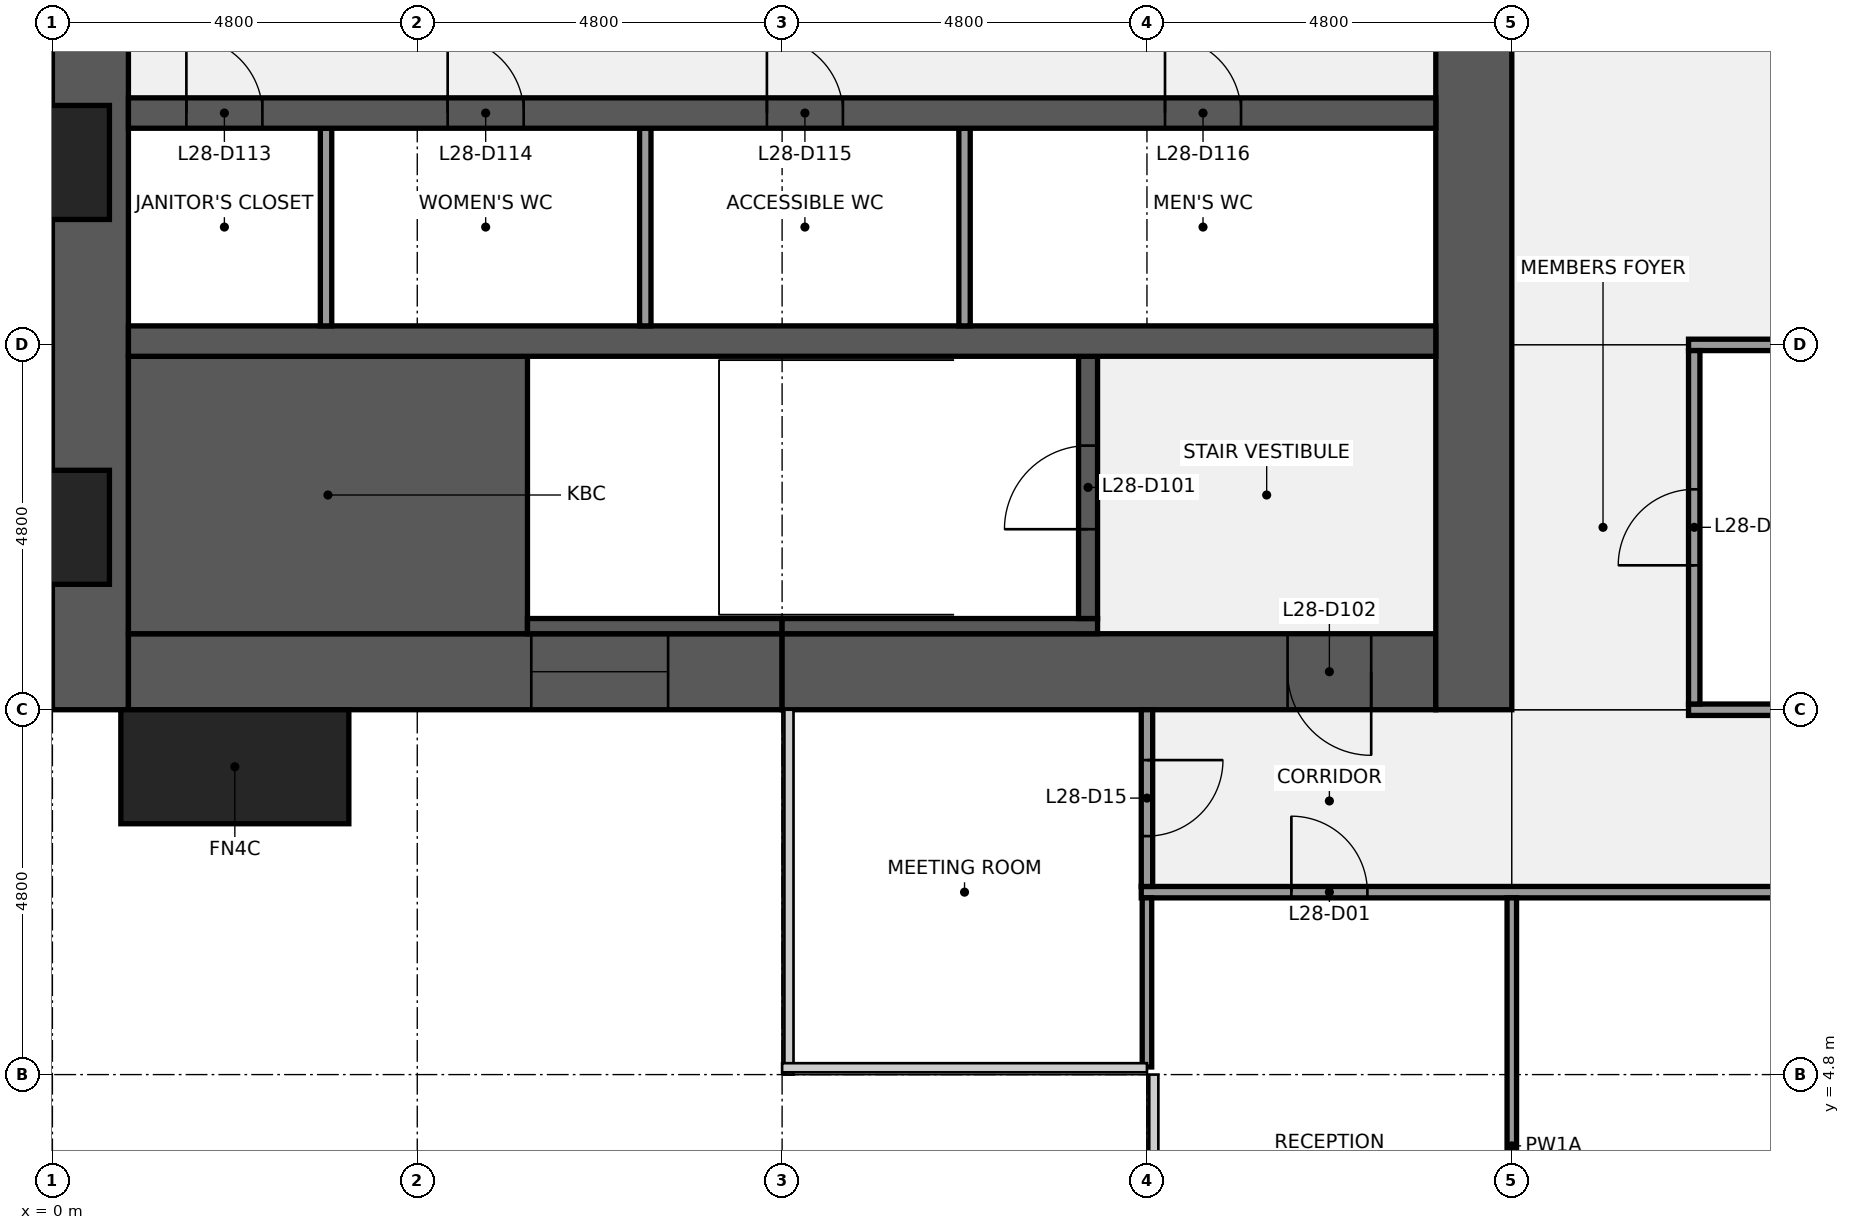
"""IFC4 building model, lengths in metres.
Left out: names, types, materials, properties, quantities, classifications, styles, units other than length and angle.
Written with IfcOpenShell. Run it as: python <this file> out.ifc"""

import sys

from ifc_helpers import new_model, si_unit, direction, frame, frame_2d, origin, origin_2d, place, context, subcontext, project, spatial, rectangle, extrude, element, fill, save


model = new_model("IFC4")
c1 = context("Model", 3, precision=1e-05, world=origin(), true_north=direction((0.0, 1.0)))
c2 = subcontext(c1, "Body", "Model", "MODEL_VIEW")
j1 = project(units=[si_unit("LENGTHUNIT", "METRE"), si_unit("PLANEANGLEUNIT", "RADIAN")], contexts=[c1])
p1 = place(None, origin())
s1 = spatial("IfcSite", under=j1, at=p1, CompositionType="ELEMENT")
p2 = place(p1, origin())
s2 = spatial("IfcBuilding", under=s1, at=p2, CompositionType="ELEMENT")
p3 = place(p2, frame((0.0, 0.0, 132.1)))
s3 = spatial("IfcBuildingStorey", under=s2, at=p3, CompositionType="ELEMENT", Elevation=132.1)
p4 = place(p3, frame((0.5, 9.6, 0.0), z_axis=(0.0, 0.0, 1.0), x_axis=(0.0, 1.0, 0.0)))
e1 = element("IfcWall", 1, at=p4, inside=s3, PredefinedType="SHEAR", context=c2, shape_type="SweptSolid", body=[
    extrude(rectangle(XDim=28.8, YDim=1.0, at=frame_2d((14.4, 0.0))), origin(), (0.0, 0.0, 1.0), 3.84),
])
p5 = place(p4, frame((8.85, 0.0, 0.9)))
e2 = element("IfcOpeningElement", 2, at=p5, cuts=e1, PredefinedType="OPENING", context=c2, shape_type="SweptSolid", body=[
    extrude(rectangle(XDim=1.5, YDim=1.5, at=frame_2d((0.75, 0.75))), frame((0.0, 0.51, 0.0), z_axis=(0.0, -1.0, 0.0), x_axis=(1.0, 0.0, 0.0)), (0.0, 0.0, 1.0), 1.02),
])
p6 = place(p4, frame((18.45, 0.0, 0.9)))
e3 = element("IfcOpeningElement", 3, at=p6, cuts=e1, PredefinedType="OPENING", context=c2, shape_type="SweptSolid", body=[
    extrude(rectangle(XDim=1.5, YDim=1.5, at=frame_2d((0.75, 0.75))), frame((0.0, 0.51, 0.0), z_axis=(0.0, -1.0, 0.0), x_axis=(1.0, 0.0, 0.0)), (0.0, 0.0, 1.0), 1.02),
])
p7 = place(p3, frame((9.6, 10.1, 0.0), z_axis=(0.0, 0.0, 1.0), x_axis=(-1.0, 0.0, 0.0)))
e4 = element("IfcWall", 4, at=p7, inside=s3, PredefinedType="SHEAR", context=c2, shape_type="SweptSolid", body=[
    extrude(rectangle(XDim=8.6, YDim=1.0, at=frame_2d((4.3, 0.0))), origin(), (0.0, 0.0, 1.0), 3.84),
])
p8 = place(p7, frame((1.5, 0.0, 0.9)))
e5 = element("IfcOpeningElement", 5, at=p8, cuts=e4, PredefinedType="OPENING", context=c2, shape_type="SweptSolid", body=[
    extrude(rectangle(XDim=1.8, YDim=1.5, at=frame_2d((0.9, 0.75))), frame((0.0, 0.51, 0.0), z_axis=(0.0, -1.0, 0.0), x_axis=(1.0, 0.0, 0.0)), (0.0, 0.0, 1.0), 1.02),
])
p9 = place(p3, frame((18.2, 10.1, 0.0), z_axis=(0.0, 0.0, 1.0), x_axis=(-1.0, 0.0, 0.0)))
e6 = element("IfcWall", 6, at=p9, inside=s3, PredefinedType="SHEAR", context=c2, shape_type="SweptSolid", body=[
    extrude(rectangle(XDim=8.6, YDim=1.0, at=frame_2d((4.3, 0.0))), origin(), (0.0, 0.0, 1.0), 3.84),
])
p10 = place(p9, frame((0.85, 0.0, 0.0)))
e7 = element("IfcOpeningElement", 7, at=p10, cuts=e6, PredefinedType="OPENING", context=c2, shape_type="SweptSolid", body=[
    extrude(rectangle(XDim=1.1, YDim=2.1, at=frame_2d((0.55, 1.05))), frame((0.0, 0.51, 0.0), z_axis=(0.0, -1.0, 0.0), x_axis=(1.0, 0.0, 0.0)), (0.0, 0.0, 1.0), 1.02),
])
p11 = place(p3, frame((18.7, 38.4, 0.0), z_axis=(0.0, 0.0, 1.0), x_axis=(0.0, -1.0, 0.0)))
e8 = element("IfcWall", 8, at=p11, inside=s3, PredefinedType="SHEAR", context=c2, shape_type="SweptSolid", body=[
    extrude(rectangle(XDim=28.8, YDim=1.0, at=frame_2d((14.4, 0.0))), origin(), (0.0, 0.0, 1.0), 3.84),
])
p12 = place(p11, frame((18.3, 0.0, 0.0)))
e9 = element("IfcOpeningElement", 9, at=p12, cuts=e8, PredefinedType="OPENING", context=c2, shape_type="SweptSolid", body=[
    extrude(rectangle(XDim=1.8, YDim=2.1, at=frame_2d((0.9, 1.05))), frame((0.0, 0.51, 0.0), z_axis=(0.0, -1.0, 0.0), x_axis=(1.0, 0.0, 0.0)), (0.0, 0.0, 1.0), 1.02),
])
p13 = place(p11, frame((8.7, 0.0, 0.0)))
e10 = element("IfcOpeningElement", 10, at=p13, cuts=e8, PredefinedType="OPENING", context=c2, shape_type="SweptSolid", body=[
    extrude(rectangle(XDim=1.8, YDim=2.1, at=frame_2d((0.9, 1.05))), frame((0.0, 0.51, 0.0), z_axis=(0.0, -1.0, 0.0), x_axis=(1.0, 0.0, 0.0)), (0.0, 0.0, 1.0), 1.02),
])
p14 = place(p3, frame((1.0, 12.425, 0.0), z_axis=(0.0, 0.0, 1.0), x_axis=(1.0, 0.0, 0.0)))
e11 = element("IfcWall", 11, at=p14, inside=s3, PredefinedType="SHEAR", context=c2, shape_type="SweptSolid", body=[
    extrude(rectangle(XDim=5.25, YDim=3.65, at=frame_2d((2.625, 0.0))), origin(), (0.0, 0.0, 1.0), 3.84),
])
p15 = place(p3, frame((6.25, 10.7, 0.0), z_axis=(0.0, 0.0, 1.0), x_axis=(1.0, 0.0, 0.0)))
e12 = element("IfcWall", 12, at=p15, inside=s3, PredefinedType="SHEAR", context=c2, shape_type="SweptSolid", body=[
    extrude(rectangle(XDim=3.35, YDim=0.2, at=frame_2d((1.675, 0.0))), origin(), (0.0, 0.0, 1.0), 3.84),
])
p16 = place(p3, frame((9.6, 10.7, 0.0), z_axis=(0.0, 0.0, 1.0), x_axis=(1.0, 0.0, 0.0)))
e13 = element("IfcWall", 13, at=p16, inside=s3, PredefinedType="SHEAR", context=c2, shape_type="SweptSolid", body=[
    extrude(rectangle(XDim=4.15, YDim=0.2, at=frame_2d((2.075, 0.0))), origin(), (0.0, 0.0, 1.0), 3.84),
])
p17 = place(p3, frame((13.625, 10.8, 0.0), z_axis=(0.0, 0.0, 1.0), x_axis=(0.0, 1.0, 0.0)))
e14 = element("IfcWall", 14, at=p17, inside=s3, PredefinedType="SHEAR", context=c2, shape_type="SweptSolid", body=[
    extrude(rectangle(XDim=3.45, YDim=0.25, at=frame_2d((1.725, 0.0))), origin(), (0.0, 0.0, 1.0), 3.84),
])
p18 = place(p17, frame((1.175, 0.0, 0.0)))
e15 = element("IfcOpeningElement", 15, at=p18, cuts=e14, PredefinedType="OPENING", context=c2, shape_type="SweptSolid", body=[
    extrude(rectangle(XDim=1.1, YDim=2.1, at=frame_2d((0.55, 1.05))), frame((0.0, 0.135, 0.0), z_axis=(0.0, -1.0, 0.0), x_axis=(1.0, 0.0, 0.0)), (0.0, 0.0, 1.0), 0.27),
])
p19 = place(p3, frame((1.0, 14.45, 0.0), z_axis=(0.0, 0.0, 1.0), x_axis=(1.0, 0.0, 0.0)))
e16 = element("IfcWall", 16, at=p19, inside=s3, PredefinedType="SHEAR", context=c2, shape_type="SweptSolid", body=[
    extrude(rectangle(XDim=17.2, YDim=0.4, at=frame_2d((8.6, 0.0))), origin(), (0.0, 0.0, 1.0), 3.84),
])
for number, where, z_axis, x_axis in (
    (17, (3.6, 14.65, 0.0), (0.0, 0.0, 1.0), (0.0, 1.0, 0.0)),
    (18, (7.8, 14.65, 0.0), (0.0, 0.0, 1.0), (0.0, 1.0, 0.0)),
    (19, (12.0, 14.65, 0.0), (0.0, 0.0, 1.0), (0.0, 1.0, 0.0)),
):
    element("IfcWall", number, at=place(p3, frame(where, z_axis=z_axis, x_axis=x_axis)), inside=s3, PredefinedType="PARTITIONING", context=c2, shape_type="SweptSolid", body=[
        extrude(rectangle(XDim=2.6, YDim=0.15, at=frame_2d((1.3, 0.0))), origin(), (0.0, 0.0, 1.0), 3.84),
    ])
p20 = place(p3, frame((1.0, 17.45, 0.0), z_axis=(0.0, 0.0, 1.0), x_axis=(1.0, 0.0, 0.0)))
e20 = element("IfcWall", 20, at=p20, inside=s3, PredefinedType="SHEAR", context=c2, shape_type="SweptSolid", body=[
    extrude(rectangle(XDim=17.2, YDim=0.4, at=frame_2d((8.6, 0.0))), origin(), (0.0, 0.0, 1.0), 3.84),
])
p21 = place(p20, frame((0.762, 0.0, 0.0)))
e21 = element("IfcOpeningElement", 21, at=p21, cuts=e20, PredefinedType="OPENING", context=c2, shape_type="SweptSolid", body=[
    extrude(rectangle(XDim=1.0, YDim=2.1, at=frame_2d((0.5, 1.05))), frame((0.0, 0.21, 0.0), z_axis=(0.0, -1.0, 0.0), x_axis=(1.0, 0.0, 0.0)), (0.0, 0.0, 1.0), 0.42),
])
p22 = place(p20, frame((4.2, 0.0, 0.0)))
e22 = element("IfcOpeningElement", 22, at=p22, cuts=e20, PredefinedType="OPENING", context=c2, shape_type="SweptSolid", body=[
    extrude(rectangle(XDim=1.0, YDim=2.1, at=frame_2d((0.5, 1.05))), frame((0.0, 0.21, 0.0), z_axis=(0.0, -1.0, 0.0), x_axis=(1.0, 0.0, 0.0)), (0.0, 0.0, 1.0), 0.42),
])
p23 = place(p20, frame((8.4, 0.0, 0.0)))
e23 = element("IfcOpeningElement", 23, at=p23, cuts=e20, PredefinedType="OPENING", context=c2, shape_type="SweptSolid", body=[
    extrude(rectangle(XDim=1.0, YDim=2.1, at=frame_2d((0.5, 1.05))), frame((0.0, 0.21, 0.0), z_axis=(0.0, -1.0, 0.0), x_axis=(1.0, 0.0, 0.0)), (0.0, 0.0, 1.0), 0.42),
])
p24 = place(p20, frame((13.637, 0.0, 0.0)))
e24 = element("IfcOpeningElement", 24, at=p24, cuts=e20, PredefinedType="OPENING", context=c2, shape_type="SweptSolid", body=[
    extrude(rectangle(XDim=1.0, YDim=2.1, at=frame_2d((0.5, 1.05))), frame((0.0, 0.21, 0.0), z_axis=(0.0, -1.0, 0.0), x_axis=(1.0, 0.0, 0.0)), (0.0, 0.0, 1.0), 0.42),
])
p25 = place(p3, frame((14.325, 7.2, 0.0), z_axis=(0.0, 0.0, 1.0), x_axis=(1.0, 0.0, 0.0)))
e25 = element("IfcWall", 25, at=p25, inside=s3, PredefinedType="PARTITIONING", context=c2, shape_type="SweptSolid", body=[
    extrude(rectangle(XDim=28.95, YDim=0.15, at=frame_2d((14.475, 0.0))), origin(), (0.0, 0.0, 1.0), 2.936),
])
p26 = place(p25, frame((1.975, 0.0, 0.0)))
e26 = element("IfcOpeningElement", 26, at=p26, cuts=e25, PredefinedType="OPENING", context=c2, shape_type="SweptSolid", body=[
    extrude(rectangle(XDim=1.0, YDim=2.1, at=frame_2d((0.5, 1.05))), frame((0.0, 0.085, 0.0), z_axis=(0.0, -1.0, 0.0), x_axis=(1.0, 0.0, 0.0)), (0.0, 0.0, 1.0), 0.17),
])
p27 = place(p25, frame((13.975, 0.0, 0.0)))
e27 = element("IfcOpeningElement", 27, at=p27, cuts=e25, PredefinedType="OPENING", context=c2, shape_type="SweptSolid", body=[
    extrude(rectangle(XDim=1.0, YDim=2.1, at=frame_2d((0.5, 1.05))), frame((0.0, 0.085, 0.0), z_axis=(0.0, -1.0, 0.0), x_axis=(1.0, 0.0, 0.0)), (0.0, 0.0, 1.0), 0.17),
])
p28 = place(p25, frame((25.975, 0.0, 0.0)))
e28 = element("IfcOpeningElement", 28, at=p28, cuts=e25, PredefinedType="OPENING", context=c2, shape_type="SweptSolid", body=[
    extrude(rectangle(XDim=1.0, YDim=2.1, at=frame_2d((0.5, 1.05))), frame((0.0, 0.085, 0.0), z_axis=(0.0, -1.0, 0.0), x_axis=(1.0, 0.0, 0.0)), (0.0, 0.0, 1.0), 0.17),
])
p29 = place(p3, frame((21.525, 9.6, 0.0), z_axis=(0.0, 0.0, 1.0), x_axis=(1.0, 0.0, 0.0)))
e29 = element("IfcWall", 29, at=p29, inside=s3, PredefinedType="PARTITIONING", context=c2, shape_type="SweptSolid", body=[
    extrude(rectangle(XDim=14.55, YDim=0.15, at=frame_2d((7.275, 0.0))), origin(), (0.0, 0.0, 1.0), 2.936),
])
p30 = place(p29, frame((6.775, 0.0, 0.0)))
e30 = element("IfcOpeningElement", 30, at=p30, cuts=e29, PredefinedType="OPENING", context=c2, shape_type="SweptSolid", body=[
    extrude(rectangle(XDim=1.0, YDim=2.1, at=frame_2d((0.5, 1.05))), frame((0.0, 0.085, 0.0), z_axis=(0.0, -1.0, 0.0), x_axis=(1.0, 0.0, 0.0)), (0.0, 0.0, 1.0), 0.17),
])
p31 = place(p29, frame((11.575, 0.0, 0.0)))
e31 = element("IfcOpeningElement", 31, at=p31, cuts=e29, PredefinedType="OPENING", context=c2, shape_type="SweptSolid", body=[
    extrude(rectangle(XDim=1.0, YDim=2.1, at=frame_2d((0.5, 1.05))), frame((0.0, 0.085, 0.0), z_axis=(0.0, -1.0, 0.0), x_axis=(1.0, 0.0, 0.0)), (0.0, 0.0, 1.0), 0.17),
])
p32 = place(p3, frame((21.525, 14.4, 0.0), z_axis=(0.0, 0.0, 1.0), x_axis=(1.0, 0.0, 0.0)))
e32 = element("IfcWall", 32, at=p32, inside=s3, PredefinedType="PARTITIONING", context=c2, shape_type="SweptSolid", body=[
    extrude(rectangle(XDim=4.95, YDim=0.15, at=frame_2d((2.475, 0.0))), origin(), (0.0, 0.0, 1.0), 2.936),
])
p33 = place(p3, frame((14.4, 4.9, 0.0), z_axis=(0.0, 0.0, 1.0), x_axis=(0.0, 1.0, 0.0)))
e33 = element("IfcWall", 33, at=p33, inside=s3, PredefinedType="PARTITIONING", context=c2, shape_type="SweptSolid", body=[
    extrude(rectangle(XDim=2.225, YDim=0.125, at=frame_2d((1.113, 0.0))), origin(), (0.0, 0.0, 1.0), 2.936),
])
p34 = place(p3, frame((14.4, 7.275, 0.0), z_axis=(0.0, 0.0, 1.0), x_axis=(0.0, 1.0, 0.0)))
e34 = element("IfcWall", 34, at=p34, inside=s3, PredefinedType="PARTITIONING", context=c2, shape_type="SweptSolid", body=[
    extrude(rectangle(XDim=2.325, YDim=0.15, at=frame_2d((1.163, 0.0))), origin(), (0.0, 0.0, 1.0), 2.936),
])
p35 = place(p34, frame((0.663, 0.0, 0.0)))
e35 = element("IfcOpeningElement", 35, at=p35, cuts=e34, PredefinedType="OPENING", context=c2, shape_type="SweptSolid", body=[
    extrude(rectangle(XDim=1.0, YDim=2.1, at=frame_2d((0.5, 1.05))), frame((0.0, 0.085, 0.0), z_axis=(0.0, -1.0, 0.0), x_axis=(1.0, 0.0, 0.0)), (0.0, 0.0, 1.0), 0.17),
])
p36 = place(p3, frame((19.2, 0.6, 0.0), z_axis=(0.0, 0.0, 1.0), x_axis=(0.0, 1.0, 0.0)))
e36 = element("IfcWall", 36, at=p36, inside=s3, PredefinedType="PARTITIONING", context=c2, shape_type="SweptSolid", body=[
    extrude(rectangle(XDim=6.525, YDim=0.125, at=frame_2d((3.262, 0.0))), origin(), (0.0, 0.0, 1.0), 2.936),
])
p37 = place(p3, frame((21.6, 9.675, 0.0), z_axis=(0.0, 0.0, 1.0), x_axis=(0.0, 1.0, 0.0)))
e37 = element("IfcWall", 37, at=p37, inside=s3, PredefinedType="PARTITIONING", context=c2, shape_type="SweptSolid", body=[
    extrude(rectangle(XDim=4.65, YDim=0.15, at=frame_2d((2.325, 0.0))), origin(), (0.0, 0.0, 1.0), 2.936),
])
p38 = place(p37, frame((1.825, 0.0, 0.0)))
e38 = element("IfcOpeningElement", 38, at=p38, cuts=e37, PredefinedType="OPENING", context=c2, shape_type="SweptSolid", body=[
    extrude(rectangle(XDim=1.0, YDim=2.1, at=frame_2d((0.5, 1.05))), frame((0.0, 0.085, 0.0), z_axis=(0.0, -1.0, 0.0), x_axis=(1.0, 0.0, 0.0)), (0.0, 0.0, 1.0), 0.17),
])
p39 = place(p3, frame((2.4, 8.85, 0.0), z_axis=(0.0, 0.0, 1.0), x_axis=(1.0, 0.0, 0.0)))
e39 = element("IfcColumn", 39, at=p39, inside=s3, PredefinedType="PILASTER", context=c2, shape_type="SweptSolid", body=[
    extrude(rectangle(XDim=3.0, YDim=1.5, at=origin_2d()), origin(), (0.0, 0.0, 1.0), 4.0),
])
p40 = place(p18, origin())
e40 = element("IfcDoor", 40, at=p40, inside=s3, OperationType="SINGLE_SWING_LEFT", PredefinedType="DOOR", context=c2, shape_type="SweptSolid", body=[
    extrude(rectangle(XDim=1.1, YDim=2.1, at=frame_2d((0.55, 1.05))), frame((0.0, 0.025, 0.0), z_axis=(0.0, -1.0, 0.0), x_axis=(1.0, 0.0, 0.0)), (0.0, 0.0, 1.0), 0.05),
])
fill(e15, e40)
p41 = place(p10, origin())
e41 = element("IfcDoor", 41, at=p41, inside=s3, OperationType="SINGLE_SWING_LEFT", PredefinedType="DOOR", context=c2, shape_type="SweptSolid", body=[
    extrude(rectangle(XDim=1.1, YDim=2.1, at=frame_2d((0.55, 1.05))), frame((0.0, 0.025, 0.0), z_axis=(0.0, -1.0, 0.0), x_axis=(1.0, 0.0, 0.0)), (0.0, 0.0, 1.0), 0.05),
])
fill(e7, e41)
p42 = place(p21, origin())
e42 = element("IfcDoor", 42, at=p42, inside=s3, OperationType="SINGLE_SWING_LEFT", PredefinedType="DOOR", context=c2, shape_type="SweptSolid", body=[
    extrude(rectangle(XDim=1.0, YDim=2.1, at=frame_2d((0.5, 1.05))), frame((0.0, 0.025, 0.0), z_axis=(0.0, -1.0, 0.0), x_axis=(1.0, 0.0, 0.0)), (0.0, 0.0, 1.0), 0.05),
])
fill(e21, e42)
p43 = place(p22, origin())
e43 = element("IfcDoor", 43, at=p43, inside=s3, OperationType="SINGLE_SWING_LEFT", PredefinedType="DOOR", context=c2, shape_type="SweptSolid", body=[
    extrude(rectangle(XDim=1.0, YDim=2.1, at=frame_2d((0.5, 1.05))), frame((0.0, 0.025, 0.0), z_axis=(0.0, -1.0, 0.0), x_axis=(1.0, 0.0, 0.0)), (0.0, 0.0, 1.0), 0.05),
])
fill(e22, e43)
p44 = place(p23, origin())
e44 = element("IfcDoor", 44, at=p44, inside=s3, OperationType="SINGLE_SWING_LEFT", PredefinedType="DOOR", context=c2, shape_type="SweptSolid", body=[
    extrude(rectangle(XDim=1.0, YDim=2.1, at=frame_2d((0.5, 1.05))), frame((0.0, 0.025, 0.0), z_axis=(0.0, -1.0, 0.0), x_axis=(1.0, 0.0, 0.0)), (0.0, 0.0, 1.0), 0.05),
])
fill(e23, e44)
p45 = place(p24, origin())
e45 = element("IfcDoor", 45, at=p45, inside=s3, OperationType="SINGLE_SWING_LEFT", PredefinedType="DOOR", context=c2, shape_type="SweptSolid", body=[
    extrude(rectangle(XDim=1.0, YDim=2.1, at=frame_2d((0.5, 1.05))), frame((0.0, 0.025, 0.0), z_axis=(0.0, -1.0, 0.0), x_axis=(1.0, 0.0, 0.0)), (0.0, 0.0, 1.0), 0.05),
])
fill(e24, e45)
p46 = place(p8, origin())
e46 = element("IfcWindow", 46, at=p46, inside=s3, PartitioningType="SINGLE_PANEL", PredefinedType="WINDOW", context=c2, shape_type="SweptSolid", body=[
    extrude(rectangle(XDim=1.8, YDim=1.5, at=frame_2d((0.9, 0.75))), frame((0.0, 0.03, 0.0), z_axis=(0.0, -1.0, 0.0), x_axis=(1.0, 0.0, 0.0)), (0.0, 0.0, 1.0), 0.06),
])
fill(e5, e46)
p47 = place(p26, origin())
e47 = element("IfcDoor", 47, at=p47, inside=s3, OperationType="SINGLE_SWING_LEFT", PredefinedType="DOOR", context=c2, shape_type="SweptSolid", body=[
    extrude(rectangle(XDim=1.0, YDim=2.1, at=frame_2d((0.5, 1.05))), frame((0.0, 0.025, 0.0), z_axis=(0.0, -1.0, 0.0), x_axis=(1.0, 0.0, 0.0)), (0.0, 0.0, 1.0), 0.05),
])
fill(e26, e47)
p48 = place(p35, origin())
e48 = element("IfcDoor", 48, at=p48, inside=s3, OperationType="SINGLE_SWING_RIGHT", PredefinedType="DOOR", context=c2, shape_type="SweptSolid", body=[
    extrude(rectangle(XDim=1.0, YDim=2.1, at=frame_2d((0.5, 1.05))), frame((0.0, 0.025, 0.0), z_axis=(0.0, -1.0, 0.0), x_axis=(1.0, 0.0, 0.0)), (0.0, 0.0, 1.0), 0.05),
])
fill(e35, e48)
p49 = place(p38, origin())
e49 = element("IfcDoor", 49, at=p49, inside=s3, OperationType="SINGLE_SWING_LEFT", PredefinedType="DOOR", context=c2, shape_type="SweptSolid", body=[
    extrude(rectangle(XDim=1.0, YDim=2.1, at=frame_2d((0.5, 1.05))), frame((0.0, 0.025, 0.0), z_axis=(0.0, -1.0, 0.0), x_axis=(1.0, 0.0, 0.0)), (0.0, 0.0, 1.0), 0.05),
])
fill(e38, e49)
save(model, sys.argv[1])
